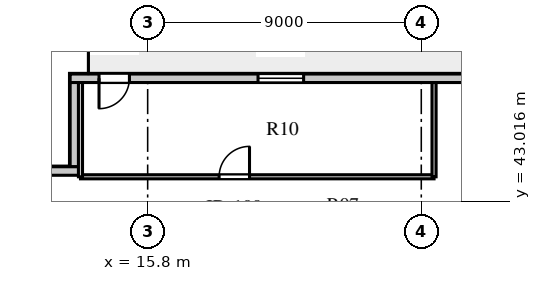
"""IFC4 building model, lengths in metres.
Left out: names, types, materials, properties, quantities, classifications, styles, units other than length and angle.
Written with IfcOpenShell. Run it as: python <this file> out.ifc"""

import sys

from ifc_helpers import new_model, si_unit, direction, frame, frame_2d, origin, place, context, subcontext, project, spatial, rectangle, extrude, element, fill, save


model = new_model("IFC4")
c1 = context("Model", 3, precision=1e-05, world=origin(), true_north=direction((0.0, 1.0)))
c2 = subcontext(c1, "Body", "Model", "MODEL_VIEW")
j1 = project(units=[si_unit("LENGTHUNIT", "METRE"), si_unit("PLANEANGLEUNIT", "RADIAN")], contexts=[c1])
p1 = place(None, origin())
s1 = spatial("IfcSite", under=j1, at=p1, CompositionType="ELEMENT")
p2 = place(p1, origin())
s2 = spatial("IfcBuilding", under=s1, at=p2, CompositionType="ELEMENT")
p3 = place(p2, frame((0.0, 0.0, 119.4)))
s3 = spatial("IfcBuildingStorey", under=s2, at=p3, CompositionType="ELEMENT", Elevation=119.4)
p4 = place(p3, frame((45.35, 47.06, 0.0), z_axis=(0.0, 0.0, 1.0), x_axis=(-1.0, 0.0, 0.0)))
e1 = element("IfcWall", 1, at=p4, inside=s3, PredefinedType="STANDARD", context=c2, shape_type="SweptSolid", body=[
    extrude(rectangle(XDim=32.1, YDim=0.28, at=frame_2d((16.05, 0.0))), origin(), (0.0, 0.0, 1.0), 3.6),
])
p5 = place(p4, frame((30.15, 0.0, 0.0)))
e2 = element("IfcOpeningElement", 2, at=p5, cuts=e1, PredefinedType="OPENING", context=c2, shape_type="SweptSolid", body=[
    extrude(rectangle(XDim=1.0, YDim=2.05, at=frame_2d((0.5, 1.025))), frame((0.0, 0.15, 0.0), z_axis=(0.0, -1.0, 0.0), x_axis=(1.0, 0.0, 0.0)), (0.0, 0.0, 1.0), 0.3),
])
p6 = place(p4, frame((24.42, 0.0, 0.8)))
e3 = element("IfcOpeningElement", 3, at=p6, cuts=e1, PredefinedType="OPENING", context=c2, shape_type="SweptSolid", body=[
    extrude(rectangle(XDim=1.5, YDim=2.0, at=frame_2d((0.75, 1.0))), frame((0.0, 0.15, 0.0), z_axis=(0.0, -1.0, 0.0), x_axis=(1.0, 0.0, 0.0)), (0.0, 0.0, 1.0), 0.3),
])
p7 = place(p4, frame((15.845, 0.0, 0.8)))
e4 = element("IfcOpeningElement", 4, at=p7, cuts=e1, PredefinedType="OPENING", context=c2, shape_type="SweptSolid", body=[
    extrude(rectangle(XDim=1.2, YDim=1.75, at=frame_2d((0.6, 0.875))), frame((0.0, 0.15, 0.0), z_axis=(0.0, -1.0, 0.0), x_axis=(1.0, 0.0, 0.0)), (0.0, 0.0, 1.0), 0.3),
])
p8 = place(p4, frame((11.095, 0.0, 0.8)))
e5 = element("IfcOpeningElement", 5, at=p8, cuts=e1, PredefinedType="OPENING", context=c2, shape_type="SweptSolid", body=[
    extrude(rectangle(XDim=1.2, YDim=1.75, at=frame_2d((0.6, 0.875))), frame((0.0, 0.15, 0.0), z_axis=(0.0, -1.0, 0.0), x_axis=(1.0, 0.0, 0.0)), (0.0, 0.0, 1.0), 0.3),
])
p9 = place(p4, frame((6.53, 0.0, 0.8)))
e6 = element("IfcOpeningElement", 6, at=p9, cuts=e1, PredefinedType="OPENING", context=c2, shape_type="SweptSolid", body=[
    extrude(rectangle(XDim=2.1, YDim=1.95, at=frame_2d((1.05, 0.975))), frame((0.0, 0.15, 0.0), z_axis=(0.0, -1.0, 0.0), x_axis=(1.0, 0.0, 0.0)), (0.0, 0.0, 1.0), 0.3),
])
p10 = place(p4, frame((1.645, 0.0, 0.8)))
e7 = element("IfcOpeningElement", 7, at=p10, cuts=e1, PredefinedType="OPENING", context=c2, shape_type="SweptSolid", body=[
    extrude(rectangle(XDim=1.35, YDim=1.9, at=frame_2d((0.675, 0.95))), frame((0.0, 0.15, 0.0), z_axis=(0.0, -1.0, 0.0), x_axis=(1.0, 0.0, 0.0)), (0.0, 0.0, 1.0), 0.3),
])
p11 = place(p3, frame((13.39, 46.92, 0.0), z_axis=(0.0, 0.0, 1.0), x_axis=(0.0, -1.0, 0.0)))
e8 = element("IfcWall", 8, at=p11, inside=s3, PredefinedType="STANDARD", context=c2, shape_type="SweptSolid", body=[
    extrude(rectangle(XDim=2.77, YDim=0.28, at=frame_2d((1.385, 0.0))), origin(), (0.0, 0.0, 1.0), 3.6),
])
p12 = place(p3, frame((13.53, 44.01, 0.0), z_axis=(0.0, 0.0, 1.0), x_axis=(-1.0, 0.0, 0.0)))
e9 = element("IfcWall", 9, at=p12, inside=s3, PredefinedType="STANDARD", context=c2, shape_type="SweptSolid", body=[
    extrude(rectangle(XDim=3.33, YDim=0.28, at=frame_2d((1.665, 0.0))), origin(), (0.0, 0.0, 1.0), 3.6),
])
p13 = place(p3, frame((13.59, 43.82, 0.0), z_axis=(0.0, 0.0, 1.0), x_axis=(1.0, 0.0, 0.0)))
e10 = element("IfcWall", 10, at=p13, inside=s3, PredefinedType="PARTITIONING", context=c2, shape_type="SweptSolid", body=[
    extrude(rectangle(XDim=11.63, YDim=0.135, at=frame_2d((5.815, 0.0))), origin(), (0.0, 0.0, 1.0), 3.6),
])
p14 = place(p13, frame((4.56, 0.0, 0.0)))
e11 = element("IfcOpeningElement", 11, at=p14, cuts=e10, PredefinedType="OPENING", context=c2, shape_type="SweptSolid", body=[
    extrude(rectangle(XDim=1.0, YDim=2.08, at=frame_2d((0.5, 1.04))), frame((0.0, 0.078, 0.0), z_axis=(0.0, -1.0, 0.0), x_axis=(1.0, 0.0, 0.0)), (0.0, 0.0, 1.0), 0.155),
])
p15 = place(p3, frame((13.59, 43.82, 0.0), z_axis=(0.0, 0.0, 1.0), x_axis=(0.0, 1.0, 0.0)))
e12 = element("IfcWall", 12, at=p15, inside=s3, PredefinedType="PARTITIONING", context=c2, shape_type="SweptSolid", body=[
    extrude(rectangle(XDim=3.1, YDim=0.135, at=frame_2d((1.55, 0.0))), origin(), (0.0, 0.0, 1.0), 3.6),
])
p16 = place(p3, frame((25.22, 43.82, 0.0), z_axis=(0.0, 0.0, 1.0), x_axis=(0.0, 1.0, 0.0)))
e13 = element("IfcWall", 13, at=p16, inside=s3, PredefinedType="PARTITIONING", context=c2, shape_type="SweptSolid", body=[
    extrude(rectangle(XDim=3.1, YDim=0.135, at=frame_2d((1.55, 0.0))), origin(), (0.0, 0.0, 1.0), 3.1),
])
p17 = place(p5, frame((1.0, 0.0, 0.0), z_axis=(0.0, 0.0, 1.0), x_axis=(-1.0, 0.0, 0.0)))
e14 = element("IfcDoor", 14, at=p17, inside=s3, OperationType="SINGLE_SWING_LEFT", PredefinedType="DOOR", context=c2, shape_type="SweptSolid", body=[
    extrude(rectangle(XDim=1.0, YDim=2.05, at=frame_2d((0.5, 1.025))), frame((0.0, 0.025, 0.0), z_axis=(0.0, -1.0, 0.0), x_axis=(1.0, 0.0, 0.0)), (0.0, 0.0, 1.0), 0.05),
])
fill(e2, e14)
p18 = place(p6, origin())
e15 = element("IfcWindow", 15, at=p18, inside=s3, PartitioningType="SINGLE_PANEL", PredefinedType="WINDOW", context=c2, shape_type="SweptSolid", body=[
    extrude(rectangle(XDim=1.5, YDim=2.0, at=frame_2d((0.75, 1.0))), frame((0.0, 0.03, 0.0), z_axis=(0.0, -1.0, 0.0), x_axis=(1.0, 0.0, 0.0)), (0.0, 0.0, 1.0), 0.06),
])
fill(e3, e15)
p19 = place(p14, origin())
e16 = element("IfcDoor", 16, at=p19, inside=s3, OperationType="SINGLE_SWING_RIGHT", PredefinedType="DOOR", context=c2, shape_type="SweptSolid", body=[
    extrude(rectangle(XDim=1.0, YDim=2.08, at=frame_2d((0.5, 1.04))), frame((0.0, 0.025, 0.0), z_axis=(0.0, -1.0, 0.0), x_axis=(1.0, 0.0, 0.0)), (0.0, 0.0, 1.0), 0.05),
])
fill(e11, e16)
save(model, sys.argv[1])
